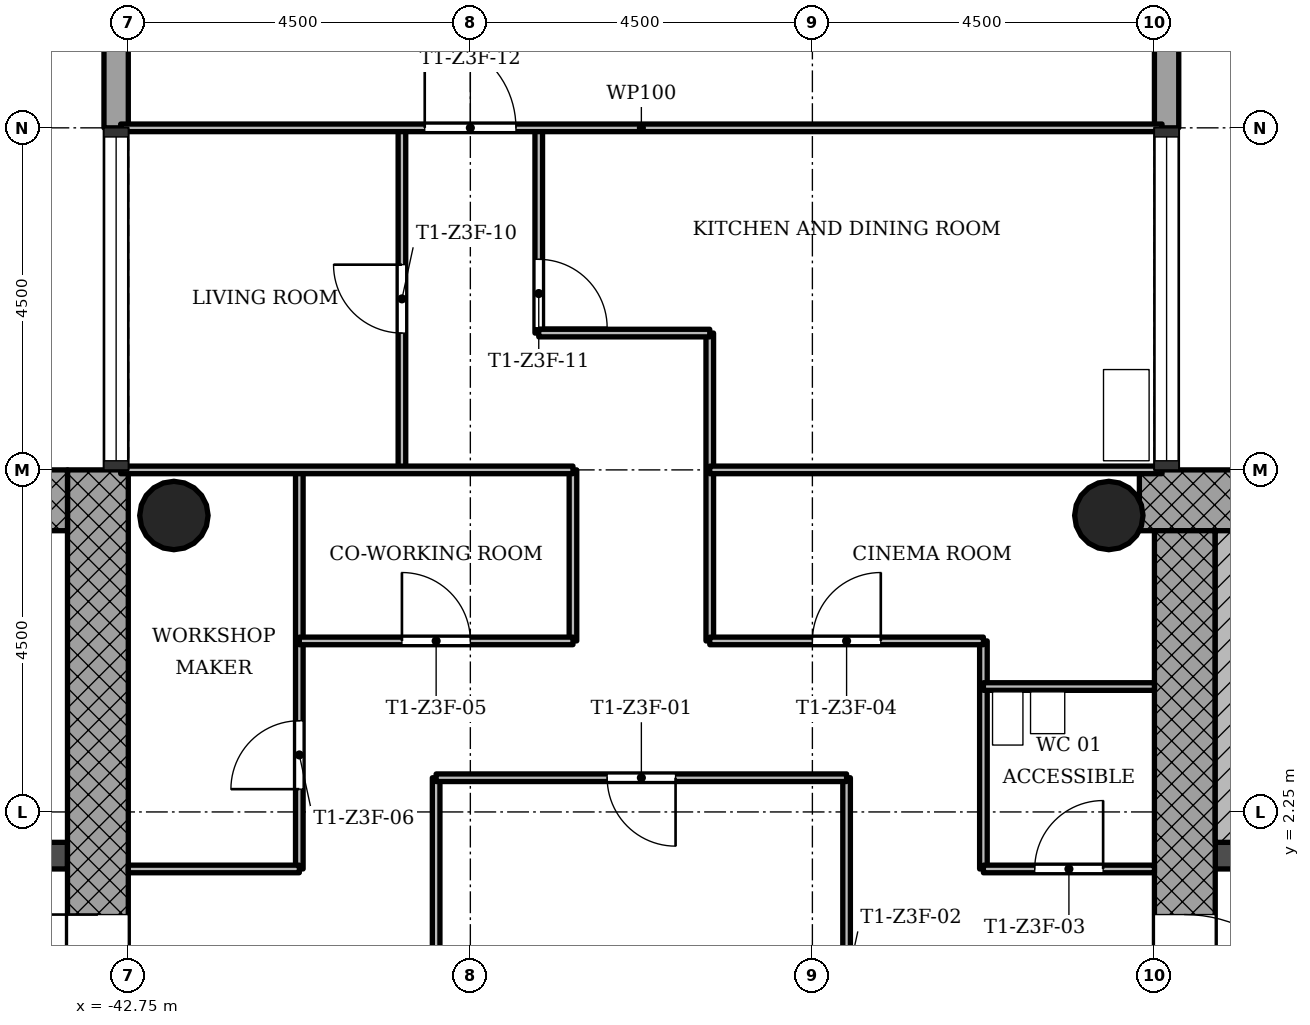
"""IFC4 building model, lengths in metres.
Left out: names, types, materials, properties, quantities, classifications, styles, units other than length and angle.
Written with IfcOpenShell. Run it as: python <this file> out.ifc"""

import sys

from ifc_helpers import new_model, si_unit, direction, frame, frame_2d, origin, origin_2d, place, context, subcontext, project, spatial, rectangle, hollow_circle, extrude, element, fill, save


model = new_model("IFC4")
c1 = context("Model", 3, precision=1e-05, world=origin(), true_north=direction((0.0, 1.0)))
c2 = subcontext(c1, "Body", "Model", "MODEL_VIEW")
j1 = project(units=[si_unit("LENGTHUNIT", "METRE"), si_unit("PLANEANGLEUNIT", "RADIAN")], contexts=[c1])
p1 = place(None, origin())
s1 = spatial("IfcSite", under=j1, at=p1, CompositionType="ELEMENT")
p2 = place(p1, origin())
s2 = spatial("IfcBuilding", under=s1, at=p2, CompositionType="ELEMENT")
p3 = place(p2, frame((0.0, 0.0, 167.7)))
s3 = spatial("IfcBuildingStorey", under=s2, at=p3, CompositionType="ELEMENT", Elevation=167.7)
p4 = place(p3, frame((-20.652, 6.35, 0.0), z_axis=(0.0, 0.0, 1.0), x_axis=(-1.0, 0.0, 0.0)))
e1 = element("IfcWall", 1, at=p4, inside=s3, PredefinedType="SHEAR", context=c2, shape_type="SweptSolid", body=[
    extrude(rectangle(XDim=8.796, YDim=0.8, at=frame_2d((4.398, 0.0))), origin(), (0.0, 0.0, 1.0), 3.4),
])
p5 = place(p3, frame((-28.85, 5.95, 0.0), z_axis=(0.0, 0.0, 1.0), x_axis=(0.0, -1.0, 0.0)))
e2 = element("IfcWall", 2, at=p5, inside=s3, PredefinedType="SHEAR", context=c2, shape_type="SweptSolid", body=[
    extrude(rectangle(XDim=12.7, YDim=0.8, at=frame_2d((6.35, 0.0))), origin(), (0.0, 0.0, 1.0), 3.4),
])
p6 = place(p5, frame((5.05, 0.0, 0.0)))
e3 = element("IfcOpeningElement", 3, at=p6, cuts=e2, PredefinedType="OPENING", context=c2, shape_type="SweptSolid", body=[
    extrude(rectangle(XDim=1.8, YDim=2.1, at=frame_2d((0.9, 1.05))), frame((0.0, 0.41, 0.0), z_axis=(0.0, -1.0, 0.0), x_axis=(1.0, 0.0, 0.0)), (0.0, 0.0, 1.0), 0.82),
])
p7 = place(p3, frame((-28.45, 1.675, 0.0), z_axis=(0.0, 0.0, 1.0), x_axis=(1.0, 0.0, 0.0)))
e4 = element("IfcWall", 4, at=p7, inside=s3, PredefinedType="SHEAR", context=c2, shape_type="SweptSolid", body=[
    extrude(rectangle(XDim=7.4, YDim=0.35, at=frame_2d((3.7, 0.0))), origin(), (0.0, 0.0, 1.0), 3.4),
])
p8 = place(p7, frame((0.85, 0.0, 0.0)))
e5 = element("IfcOpeningElement", 5, at=p8, cuts=e4, PredefinedType="OPENING", context=c2, shape_type="SweptSolid", body=[
    extrude(rectangle(XDim=0.9, YDim=2.1, at=frame_2d((0.45, 1.05))), frame((0.0, 0.185, 0.0), z_axis=(0.0, -1.0, 0.0), x_axis=(1.0, 0.0, 0.0)), (0.0, 0.0, 1.0), 0.37),
])
p9 = place(p3, frame((-43.15, -5.95, 0.0), z_axis=(0.0, 0.0, 1.0), x_axis=(0.0, 1.0, 0.0)))
e6 = element("IfcWall", 6, at=p9, inside=s3, PredefinedType="SHEAR", context=c2, shape_type="SweptSolid", body=[
    extrude(rectangle(XDim=12.7, YDim=0.8, at=frame_2d((6.35, 0.0))), origin(), (0.0, 0.0, 1.0), 3.4),
])
p10 = place(p9, frame((5.05, 0.0, 0.0)))
e7 = element("IfcOpeningElement", 7, at=p10, cuts=e6, PredefinedType="OPENING", context=c2, shape_type="SweptSolid", body=[
    extrude(rectangle(XDim=1.8, YDim=2.1, at=frame_2d((0.9, 1.05))), frame((0.0, 0.41, 0.0), z_axis=(0.0, -1.0, 0.0), x_axis=(1.0, 0.0, 0.0)), (0.0, 0.0, 1.0), 0.82),
])
p11 = place(p3, frame((-43.55, 6.35, 0.0), z_axis=(0.0, 0.0, 1.0), x_axis=(-1.0, 0.0, 0.0)))
e8 = element("IfcWall", 8, at=p11, inside=s3, PredefinedType="SHEAR", context=c2, shape_type="SweptSolid", body=[
    extrude(rectangle(XDim=8.2, YDim=0.8, at=frame_2d((4.1, 0.0))), origin(), (0.0, 0.0, 1.0), 3.4),
])
p12 = place(p3, frame((-50.95, 1.675, 0.0), z_axis=(0.0, 0.0, 1.0), x_axis=(1.0, 0.0, 0.0)))
e9 = element("IfcWall", 9, at=p12, inside=s3, PredefinedType="SHEAR", context=c2, shape_type="SweptSolid", body=[
    extrude(rectangle(XDim=7.4, YDim=0.35, at=frame_2d((3.7, 0.0))), origin(), (0.0, 0.0, 1.0), 3.4),
])
p13 = place(p12, frame((5.35, 0.0, 0.0)))
e10 = element("IfcOpeningElement", 10, at=p13, cuts=e9, PredefinedType="OPENING", context=c2, shape_type="SweptSolid", body=[
    extrude(rectangle(XDim=1.1, YDim=2.1, at=frame_2d((0.55, 1.05))), frame((0.0, 0.185, 0.0), z_axis=(0.0, -1.0, 0.0), x_axis=(1.0, 0.0, 0.0)), (0.0, 0.0, 1.0), 0.37),
])
p14 = place(p12, frame((1.0, 0.0, 0.0)))
e11 = element("IfcOpeningElement", 11, at=p14, cuts=e9, PredefinedType="OPENING", context=c2, shape_type="SweptSolid", body=[
    extrude(rectangle(XDim=1.1, YDim=2.1, at=frame_2d((0.55, 1.05))), frame((0.0, 0.185, 0.0), z_axis=(0.0, -1.0, 0.0), x_axis=(1.0, 0.0, 0.0)), (0.0, 0.0, 1.0), 0.37),
])
p15 = place(p12, frame((3.3, 0.0, 0.0)))
e12 = element("IfcOpeningElement", 12, at=p15, cuts=e9, PredefinedType="OPENING", context=c2, shape_type="SweptSolid", body=[
    extrude(rectangle(XDim=0.9, YDim=2.1, at=frame_2d((0.45, 1.05))), frame((0.0, 0.185, 0.0), z_axis=(0.0, -1.0, 0.0), x_axis=(1.0, 0.0, 0.0)), (0.0, 0.0, 1.0), 0.37),
])
for number, where, z_axis, x_axis in (
    (13, (-29.85, 6.15, 0.0), (0.0, 0.0, 1.0), (1.0, 0.0, 0.0)),
    (14, (-42.15, 6.15, 0.0), (0.0, 0.0, 1.0), (1.0, 0.0, 0.0)),
):
    element("IfcColumn", number, at=place(p3, frame(where, z_axis=z_axis, x_axis=x_axis)), inside=s3, PredefinedType="COLUMN", context=c2, shape_type="SweptSolid", body=[
        extrude(hollow_circle(Radius=0.45, WallThickness=0.032, at=origin_2d()), origin(), (0.0, 0.0, 1.0), 3.4),
    ])
p16 = place(p3, frame((-29.09, 11.25, -0.3), z_axis=(0.0, 0.0, 1.0), x_axis=(0.0, 1.0, 0.0)))
e15 = element("IfcWall", 15, at=p16, inside=s3, PredefinedType="STANDARD", context=c2, shape_type="SweptSolid", body=[
    extrude(rectangle(XDim=1.82, YDim=0.32, at=frame_2d((0.91, 0.0))), origin(), (0.0, 0.0, 1.0), 3.4),
])
p17 = place(p3, frame((-42.91, 12.75, -0.3), z_axis=(0.0, 0.0, 1.0), x_axis=(0.0, -1.0, 0.0)))
e16 = element("IfcWall", 16, at=p17, inside=s3, PredefinedType="STANDARD", context=c2, shape_type="SweptSolid", body=[
    extrude(rectangle(XDim=1.5, YDim=0.32, at=frame_2d((0.75, 0.0))), origin(), (0.0, 0.0, 1.0), 3.4),
])
p18 = place(p3, frame((-40.5, 1.5, 0.0), z_axis=(0.0, 0.0, 1.0), x_axis=(0.0, 1.0, 0.0)))
e17 = element("IfcWall", 17, at=p18, inside=s3, PredefinedType="PARTITIONING", context=c2, shape_type="SweptSolid", body=[
    extrude(rectangle(XDim=5.25, YDim=0.1, at=frame_2d((2.625, 0.0))), origin(), (0.0, 0.0, 1.0), 3.0),
])
p19 = place(p18, frame((1.05, 0.0, 0.0)))
e18 = element("IfcOpeningElement", 18, at=p19, cuts=e17, PredefinedType="OPENING", context=c2, shape_type="SweptSolid", body=[
    extrude(rectangle(XDim=0.9, YDim=2.1, at=frame_2d((0.45, 1.05))), frame((0.0, 0.06, 0.0), z_axis=(0.0, -1.0, 0.0), x_axis=(1.0, 0.0, 0.0)), (0.0, 0.0, 1.0), 0.12),
])
p20 = place(p3, frame((-39.15, 6.75, 0.0), z_axis=(0.0, 0.0, 1.0), x_axis=(0.0, 1.0, 0.0)))
e19 = element("IfcWall", 19, at=p20, inside=s3, PredefinedType="PARTITIONING", context=c2, shape_type="SweptSolid", body=[
    extrude(rectangle(XDim=4.5, YDim=0.1, at=frame_2d((2.25, 0.0))), origin(), (0.0, 0.0, 1.0), 3.0),
])
p21 = place(p20, frame((1.8, 0.0, 0.0)))
e20 = element("IfcOpeningElement", 20, at=p21, cuts=e19, PredefinedType="OPENING", context=c2, shape_type="SweptSolid", body=[
    extrude(rectangle(XDim=0.9, YDim=2.1, at=frame_2d((0.45, 1.05))), frame((0.0, 0.06, 0.0), z_axis=(0.0, -1.0, 0.0), x_axis=(1.0, 0.0, 0.0)), (0.0, 0.0, 1.0), 0.12),
])
p22 = place(p3, frame((-38.7, -2.7, 0.0), z_axis=(0.0, 0.0, 1.0), x_axis=(0.0, 1.0, 0.0)))
e21 = element("IfcWall", 21, at=p22, inside=s3, PredefinedType="PARTITIONING", context=c2, shape_type="SweptSolid", body=[
    extrude(rectangle(XDim=5.4, YDim=0.1, at=frame_2d((2.7, 0.0))), origin(), (0.0, 0.0, 1.0), 3.0),
])
p23 = place(p3, frame((-37.35, 8.55, 0.0), z_axis=(0.0, 0.0, 1.0), x_axis=(0.0, 1.0, 0.0)))
e22 = element("IfcWall", 22, at=p23, inside=s3, PredefinedType="PARTITIONING", context=c2, shape_type="SweptSolid", body=[
    extrude(rectangle(XDim=2.7, YDim=0.1, at=frame_2d((1.35, 0.0))), origin(), (0.0, 0.0, 1.0), 3.0),
])
p24 = place(p23, frame((0.07, 0.0, 0.0)))
e23 = element("IfcOpeningElement", 23, at=p24, cuts=e22, PredefinedType="OPENING", context=c2, shape_type="SweptSolid", body=[
    extrude(rectangle(XDim=0.9, YDim=2.1, at=frame_2d((0.45, 1.05))), frame((0.0, 0.06, 0.0), z_axis=(0.0, -1.0, 0.0), x_axis=(1.0, 0.0, 0.0)), (0.0, 0.0, 1.0), 0.12),
])
p25 = place(p3, frame((-36.9, 4.5, 0.0), z_axis=(0.0, 0.0, 1.0), x_axis=(0.0, 1.0, 0.0)))
e24 = element("IfcWall", 24, at=p25, inside=s3, PredefinedType="PARTITIONING", context=c2, shape_type="SweptSolid", body=[
    extrude(rectangle(XDim=2.25, YDim=0.1, at=frame_2d((1.125, 0.0))), origin(), (0.0, 0.0, 1.0), 3.0),
])
p26 = place(p3, frame((-35.1, 4.5, 0.0), z_axis=(0.0, 0.0, 1.0), x_axis=(0.0, 1.0, 0.0)))
e25 = element("IfcWall", 25, at=p26, inside=s3, PredefinedType="PARTITIONING", context=c2, shape_type="SweptSolid", body=[
    extrude(rectangle(XDim=4.05, YDim=0.1, at=frame_2d((2.025, 0.0))), origin(), (0.0, 0.0, 1.0), 3.0),
])
p27 = place(p3, frame((-33.3, -2.7, 0.0), z_axis=(0.0, 0.0, 1.0), x_axis=(0.0, 1.0, 0.0)))
e26 = element("IfcWall", 26, at=p27, inside=s3, PredefinedType="PARTITIONING", context=c2, shape_type="SweptSolid", body=[
    extrude(rectangle(XDim=5.4, YDim=0.1, at=frame_2d((2.7, 0.0))), origin(), (0.0, 0.0, 1.0), 3.0),
])
p28 = place(p27, frame((2.25, 0.0, 0.0)))
e27 = element("IfcOpeningElement", 27, at=p28, cuts=e26, PredefinedType="OPENING", context=c2, shape_type="SweptSolid", body=[
    extrude(rectangle(XDim=0.9, YDim=2.1, at=frame_2d((0.45, 1.05))), frame((0.0, 0.06, 0.0), z_axis=(0.0, -1.0, 0.0), x_axis=(1.0, 0.0, 0.0)), (0.0, 0.0, 1.0), 0.12),
])
p29 = place(p3, frame((-31.5, 1.5, 0.0), z_axis=(0.0, 0.0, 1.0), x_axis=(0.0, 1.0, 0.0)))
e28 = element("IfcWall", 28, at=p29, inside=s3, PredefinedType="PARTITIONING", context=c2, shape_type="SweptSolid", body=[
    extrude(rectangle(XDim=3.0, YDim=0.1, at=frame_2d((1.5, 0.0))), origin(), (0.0, 0.0, 1.0), 3.0),
])
p30 = place(p3, frame((-42.75, 1.5, 0.0), z_axis=(0.0, 0.0, 1.0), x_axis=(1.0, 0.0, 0.0)))
e29 = element("IfcWall", 29, at=p30, inside=s3, PredefinedType="PARTITIONING", context=c2, shape_type="SweptSolid", body=[
    extrude(rectangle(XDim=2.25, YDim=0.1, at=frame_2d((1.125, 0.0))), origin(), (0.0, 0.0, 1.0), 3.0),
])
p31 = place(p3, frame((-31.5, 1.5, 0.0), z_axis=(0.0, 0.0, 1.0), x_axis=(1.0, 0.0, 0.0)))
e30 = element("IfcWall", 30, at=p31, inside=s3, PredefinedType="PARTITIONING", context=c2, shape_type="SweptSolid", body=[
    extrude(rectangle(XDim=2.25, YDim=0.1, at=frame_2d((1.125, 0.0))), origin(), (0.0, 0.0, 1.0), 3.0),
])
p32 = place(p31, frame((0.675, 0.0, 0.0)))
e31 = element("IfcOpeningElement", 31, at=p32, cuts=e30, PredefinedType="OPENING", context=c2, shape_type="SweptSolid", body=[
    extrude(rectangle(XDim=0.9, YDim=2.1, at=frame_2d((0.45, 1.05))), frame((0.0, 0.06, 0.0), z_axis=(0.0, -1.0, 0.0), x_axis=(1.0, 0.0, 0.0)), (0.0, 0.0, 1.0), 0.12),
])
p33 = place(p3, frame((-38.7, 2.7, 0.0), z_axis=(0.0, 0.0, 1.0), x_axis=(1.0, 0.0, 0.0)))
e32 = element("IfcWall", 32, at=p33, inside=s3, PredefinedType="PARTITIONING", context=c2, shape_type="SweptSolid", body=[
    extrude(rectangle(XDim=5.4, YDim=0.1, at=frame_2d((2.7, 0.0))), origin(), (0.0, 0.0, 1.0), 3.0),
])
p34 = place(p33, frame((2.25, 0.0, 0.0)))
e33 = element("IfcOpeningElement", 33, at=p34, cuts=e32, PredefinedType="OPENING", context=c2, shape_type="SweptSolid", body=[
    extrude(rectangle(XDim=0.9, YDim=2.1, at=frame_2d((0.45, 1.05))), frame((0.0, 0.06, 0.0), z_axis=(0.0, -1.0, 0.0), x_axis=(1.0, 0.0, 0.0)), (0.0, 0.0, 1.0), 0.12),
])
p35 = place(p3, frame((-31.5, 3.9, 0.0), z_axis=(0.0, 0.0, 1.0), x_axis=(1.0, 0.0, 0.0)))
e34 = element("IfcWall", 34, at=p35, inside=s3, PredefinedType="PARTITIONING", context=c2, shape_type="SweptSolid", body=[
    extrude(rectangle(XDim=2.25, YDim=0.1, at=frame_2d((1.125, 0.0))), origin(), (0.0, 0.0, 1.0), 3.0),
])
p36 = place(p3, frame((-40.5, 4.5, 0.0), z_axis=(0.0, 0.0, 1.0), x_axis=(1.0, 0.0, 0.0)))
e35 = element("IfcWall", 35, at=p36, inside=s3, PredefinedType="PARTITIONING", context=c2, shape_type="SweptSolid", body=[
    extrude(rectangle(XDim=3.6, YDim=0.1, at=frame_2d((1.8, 0.0))), origin(), (0.0, 0.0, 1.0), 3.0),
])
p37 = place(p36, frame((1.35, 0.0, 0.0)))
e36 = element("IfcOpeningElement", 36, at=p37, cuts=e35, PredefinedType="OPENING", context=c2, shape_type="SweptSolid", body=[
    extrude(rectangle(XDim=0.9, YDim=2.1, at=frame_2d((0.45, 1.05))), frame((0.0, 0.06, 0.0), z_axis=(0.0, -1.0, 0.0), x_axis=(1.0, 0.0, 0.0)), (0.0, 0.0, 1.0), 0.12),
])
p38 = place(p3, frame((-35.1, 4.5, 0.0), z_axis=(0.0, 0.0, 1.0), x_axis=(1.0, 0.0, 0.0)))
e37 = element("IfcWall", 37, at=p38, inside=s3, PredefinedType="PARTITIONING", context=c2, shape_type="SweptSolid", body=[
    extrude(rectangle(XDim=3.6, YDim=0.1, at=frame_2d((1.8, 0.0))), origin(), (0.0, 0.0, 1.0), 3.0),
])
p39 = place(p38, frame((1.35, 0.0, 0.0)))
e38 = element("IfcOpeningElement", 38, at=p39, cuts=e37, PredefinedType="OPENING", context=c2, shape_type="SweptSolid", body=[
    extrude(rectangle(XDim=0.9, YDim=2.1, at=frame_2d((0.45, 1.05))), frame((0.0, 0.06, 0.0), z_axis=(0.0, -1.0, 0.0), x_axis=(1.0, 0.0, 0.0)), (0.0, 0.0, 1.0), 0.12),
])
for number, where, z_axis, x_axis in (
    (39, (-42.85, 6.75, 0.0), (0.0, 0.0, 1.0), (1.0, 0.0, 0.0)),
    (40, (-35.1, 6.75, 0.0), (0.0, 0.0, 1.0), (1.0, 0.0, 0.0)),
):
    element("IfcWall", number, at=place(p3, frame(where, z_axis=z_axis, x_axis=x_axis)), inside=s3, PredefinedType="PARTITIONING", context=c2, shape_type="SweptSolid", body=[
        extrude(rectangle(XDim=5.95, YDim=0.1, at=frame_2d((2.975, 0.0))), origin(), (0.0, 0.0, 1.0), 3.0),
    ])
p40 = place(p3, frame((-37.35, 8.55, 0.0), z_axis=(0.0, 0.0, 1.0), x_axis=(1.0, 0.0, 0.0)))
e41 = element("IfcWall", 41, at=p40, inside=s3, PredefinedType="PARTITIONING", context=c2, shape_type="SweptSolid", body=[
    extrude(rectangle(XDim=2.25, YDim=0.1, at=frame_2d((1.125, 0.0))), origin(), (0.0, 0.0, 1.0), 3.0),
])
p41 = place(p3, frame((-42.85, 11.25, 0.0), z_axis=(0.0, 0.0, 1.0), x_axis=(1.0, 0.0, 0.0)))
e42 = element("IfcWall", 42, at=p41, inside=s3, PredefinedType="PARTITIONING", context=c2, shape_type="SweptSolid", body=[
    extrude(rectangle(XDim=13.7, YDim=0.1, at=frame_2d((6.85, 0.0))), origin(), (0.0, 0.0, 1.0), 3.0),
])
p42 = place(p41, frame((4.0, 0.0, 0.0)))
e43 = element("IfcOpeningElement", 43, at=p42, cuts=e42, PredefinedType="OPENING", context=c2, shape_type="SweptSolid", body=[
    extrude(rectangle(XDim=1.2, YDim=2.1, at=frame_2d((0.6, 1.05))), frame((0.0, 0.06, 0.0), z_axis=(0.0, -1.0, 0.0), x_axis=(1.0, 0.0, 0.0)), (0.0, 0.0, 1.0), 0.12),
])
p43 = place(p3, frame((-28.25, 1.85, 0.0), z_axis=(0.0, 0.0, 1.0), x_axis=(0.0, 1.0, 0.0)))
e44 = element("IfcWall", 44, at=p43, inside=s3, PredefinedType="SHEAR", context=c2, shape_type="SweptSolid", body=[
    extrude(rectangle(XDim=4.1, YDim=0.4, at=frame_2d((2.05, 0.0))), origin(), (0.0, 0.0, 1.0), 3.4),
])
p44 = place(p34, origin())
e45 = element("IfcDoor", 45, at=p44, inside=s3, OperationType="SINGLE_SWING_RIGHT", PredefinedType="DOOR", context=c2, shape_type="SweptSolid", body=[
    extrude(rectangle(XDim=0.9, YDim=2.1, at=frame_2d((0.45, 1.05))), frame((0.0, 0.025, 0.0), z_axis=(0.0, -1.0, 0.0), x_axis=(1.0, 0.0, 0.0)), (0.0, 0.0, 1.0), 0.05),
])
fill(e33, e45)
p45 = place(p32, origin())
e46 = element("IfcDoor", 46, at=p45, inside=s3, OperationType="SINGLE_SWING_LEFT", PredefinedType="DOOR", context=c2, shape_type="SweptSolid", body=[
    extrude(rectangle(XDim=0.9, YDim=2.1, at=frame_2d((0.45, 1.05))), frame((0.0, 0.025, 0.0), z_axis=(0.0, -1.0, 0.0), x_axis=(1.0, 0.0, 0.0)), (0.0, 0.0, 1.0), 0.05),
])
fill(e31, e46)
p46 = place(p39, origin())
e47 = element("IfcDoor", 47, at=p46, inside=s3, OperationType="SINGLE_SWING_LEFT", PredefinedType="DOOR", context=c2, shape_type="SweptSolid", body=[
    extrude(rectangle(XDim=0.9, YDim=2.1, at=frame_2d((0.45, 1.05))), frame((0.0, 0.025, 0.0), z_axis=(0.0, -1.0, 0.0), x_axis=(1.0, 0.0, 0.0)), (0.0, 0.0, 1.0), 0.05),
])
fill(e38, e47)
p47 = place(p37, origin())
e48 = element("IfcDoor", 48, at=p47, inside=s3, OperationType="SINGLE_SWING_RIGHT", PredefinedType="DOOR", context=c2, shape_type="SweptSolid", body=[
    extrude(rectangle(XDim=0.9, YDim=2.1, at=frame_2d((0.45, 1.05))), frame((0.0, 0.025, 0.0), z_axis=(0.0, -1.0, 0.0), x_axis=(1.0, 0.0, 0.0)), (0.0, 0.0, 1.0), 0.05),
])
fill(e36, e48)
p48 = place(p19, origin())
e49 = element("IfcDoor", 49, at=p48, inside=s3, OperationType="SINGLE_SWING_RIGHT", PredefinedType="DOOR", context=c2, shape_type="SweptSolid", body=[
    extrude(rectangle(XDim=0.9, YDim=2.1, at=frame_2d((0.45, 1.05))), frame((0.0, 0.025, 0.0), z_axis=(0.0, -1.0, 0.0), x_axis=(1.0, 0.0, 0.0)), (0.0, 0.0, 1.0), 0.05),
])
fill(e18, e49)
p49 = place(p21, origin())
e50 = element("IfcDoor", 50, at=p49, inside=s3, OperationType="SINGLE_SWING_LEFT", PredefinedType="DOOR", context=c2, shape_type="SweptSolid", body=[
    extrude(rectangle(XDim=0.9, YDim=2.1, at=frame_2d((0.45, 1.05))), frame((0.0, 0.025, 0.0), z_axis=(0.0, -1.0, 0.0), x_axis=(1.0, 0.0, 0.0)), (0.0, 0.0, 1.0), 0.05),
])
fill(e20, e50)
p50 = place(p24, origin())
e51 = element("IfcDoor", 51, at=p50, inside=s3, OperationType="SINGLE_SWING_LEFT", PredefinedType="DOOR", context=c2, shape_type="SweptSolid", body=[
    extrude(rectangle(XDim=0.9, YDim=2.1, at=frame_2d((0.45, 1.05))), frame((0.0, 0.025, 0.0), z_axis=(0.0, -1.0, 0.0), x_axis=(1.0, 0.0, 0.0)), (0.0, 0.0, 1.0), 0.05),
])
fill(e23, e51)
p51 = place(p42, origin())
e52 = element("IfcDoor", 52, at=p51, inside=s3, OperationType="SINGLE_SWING_RIGHT", PredefinedType="DOOR", context=c2, shape_type="SweptSolid", body=[
    extrude(rectangle(XDim=1.2, YDim=2.1, at=frame_2d((0.6, 1.05))), frame((0.0, 0.025, 0.0), z_axis=(0.0, -1.0, 0.0), x_axis=(1.0, 0.0, 0.0)), (0.0, 0.0, 1.0), 0.05),
])
fill(e43, e52)
p52 = place(p6, origin())
e53 = element("IfcDoor", 53, at=p52, inside=s3, OperationType="SINGLE_SWING_LEFT", PredefinedType="DOOR", context=c2, shape_type="SweptSolid", body=[
    extrude(rectangle(XDim=1.8, YDim=2.1, at=frame_2d((0.9, 1.05))), frame((0.0, 0.025, 0.0), z_axis=(0.0, -1.0, 0.0), x_axis=(1.0, 0.0, 0.0)), (0.0, 0.0, 1.0), 0.05),
])
fill(e3, e53)
p53 = place(p10, origin())
e54 = element("IfcDoor", 54, at=p53, inside=s3, OperationType="SINGLE_SWING_LEFT", PredefinedType="DOOR", context=c2, shape_type="SweptSolid", body=[
    extrude(rectangle(XDim=1.8, YDim=2.1, at=frame_2d((0.9, 1.05))), frame((0.0, 0.025, 0.0), z_axis=(0.0, -1.0, 0.0), x_axis=(1.0, 0.0, 0.0)), (0.0, 0.0, 1.0), 0.05),
])
fill(e7, e54)
save(model, sys.argv[1])
